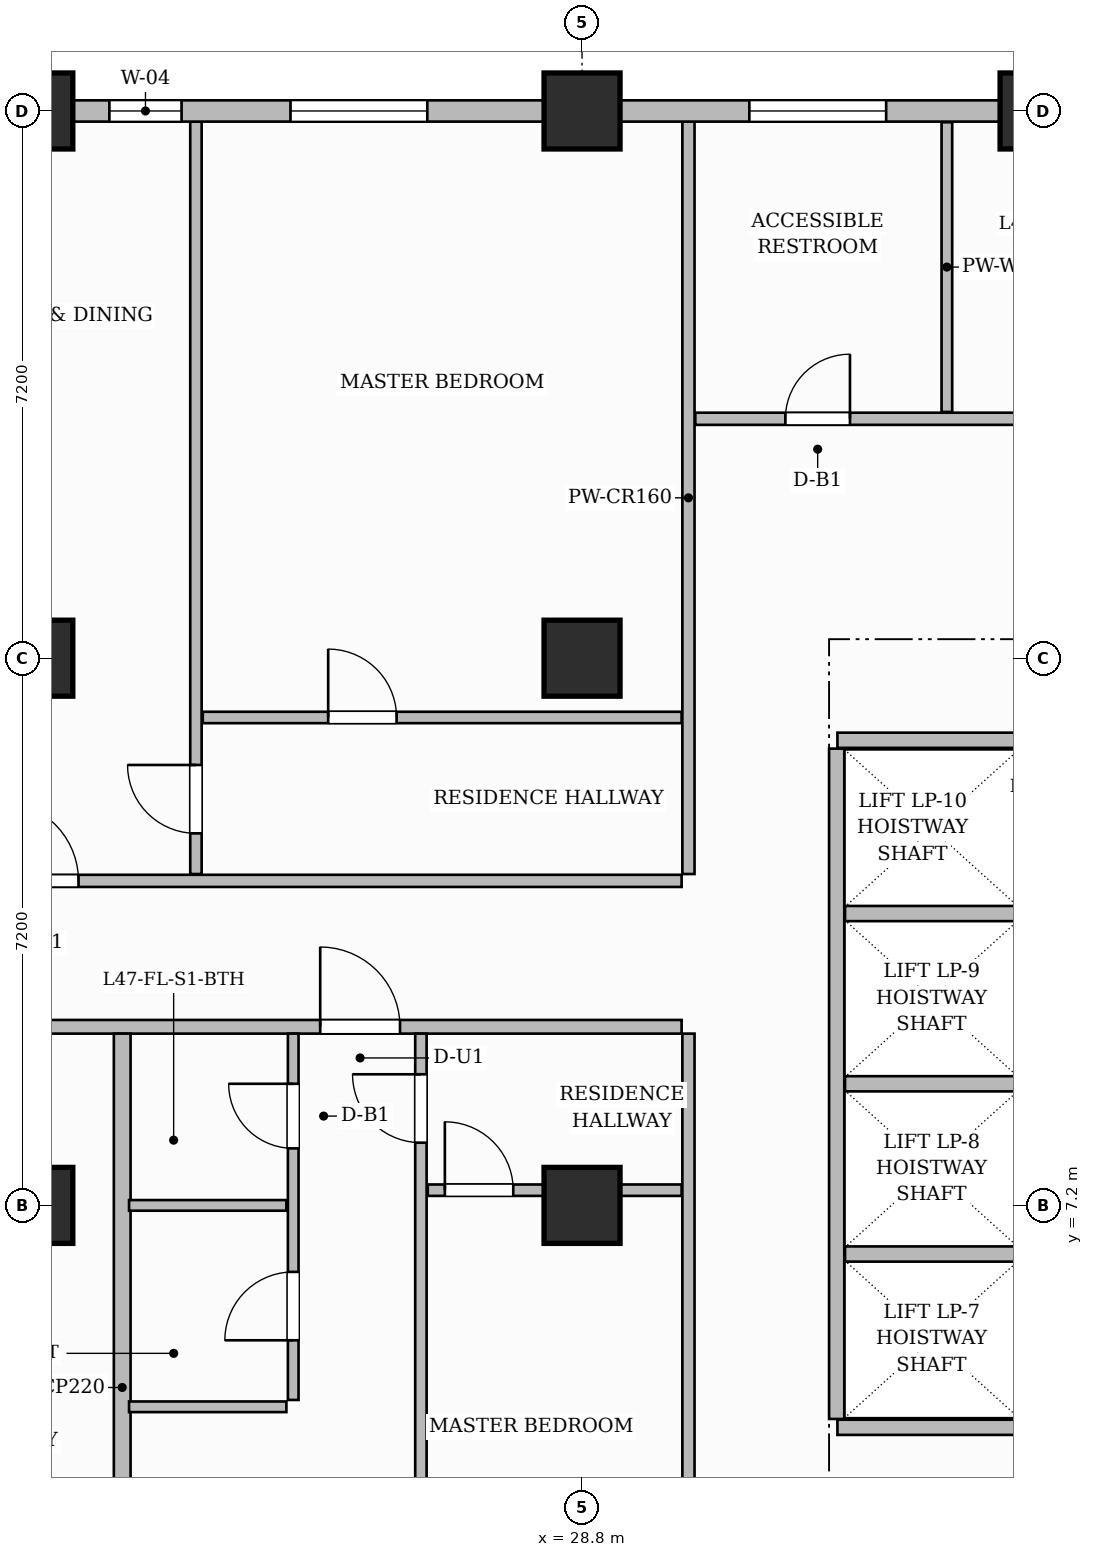
"""IFC4 building model, lengths in metres.
Left out: names, types, materials, properties, quantities, classifications, styles, units other than length and angle.
Written with IfcOpenShell. Run it as: python <this file> out.ifc"""

import sys

from ifc_helpers import new_model, si_unit, direction, frame, frame_2d, origin, origin_2d, place, context, subcontext, project, spatial, rectangle, extrude, source, transform, mapped, element, fill, save


model = new_model("IFC4")
c1 = context("Model", 3, precision=1e-05, world=origin(), true_north=direction((0.0, 1.0)))
c2 = subcontext(c1, "Body", "Model", "MODEL_VIEW")
j1 = project(units=[si_unit("LENGTHUNIT", "METRE"), si_unit("PLANEANGLEUNIT", "RADIAN")], contexts=[c1])
p1 = place(None, origin())
s1 = spatial("IfcSite", under=j1, at=p1, CompositionType="ELEMENT")
p2 = place(p1, origin())
s2 = spatial("IfcBuilding", under=s1, at=p2, CompositionType="ELEMENT")
p3 = place(p2, frame((0.0, 0.0, 188.8)))
s3 = spatial("IfcBuildingStorey", under=s2, at=p3, CompositionType="ELEMENT", Elevation=188.8)
m1 = source(origin(), c2, "Body", "SweptSolid", [
    extrude(rectangle(XDim=1.0, YDim=1.0, at=origin_2d()), origin(), (0.0, 0.0, 1.0), 3.85),
])
for number, where, z_axis, x_axis in (
    (1, (21.6, 7.2, 0.0), (0.0, 0.0, 1.0), (1.0, 0.0, 0.0)),
    (2, (21.6, 14.4, 0.0), (0.0, 0.0, 1.0), (1.0, 0.0, 0.0)),
    (3, (21.6, 21.6, 0.0), (0.0, 0.0, 1.0), (1.0, 0.0, 0.0)),
    (4, (28.8, 7.2, 0.0), (0.0, 0.0, 1.0), (1.0, 0.0, 0.0)),
    (5, (28.8, 14.4, 0.0), (0.0, 0.0, 1.0), (1.0, 0.0, 0.0)),
    (6, (28.8, 21.6, 0.0), (0.0, 0.0, 1.0), (1.0, 0.0, 0.0)),
    (7, (34.8, 21.6, 0.0), (0.0, 0.0, 1.0), (1.0, 0.0, 0.0)),
):
    element("IfcColumn", number, at=place(p3, frame(where, z_axis=z_axis, x_axis=x_axis)), inside=s3, PredefinedType="COLUMN", context=c2, shape_type="MappedRepresentation", body=[
        mapped(m1, transform((0.0, 0.0, 0.0), scale=1.0)),
    ])
for number, where, z_axis, x_axis in (
    (8, (32.16, 4.28, 0.0), (0.0, 0.0, 1.0), (1.0, 0.0, 0.0)),
    (9, (32.16, 13.32, 0.0), (0.0, 0.0, 1.0), (1.0, 0.0, 0.0)),
):
    element("IfcWall", number, at=place(p3, frame(where, z_axis=z_axis, x_axis=x_axis)), inside=s3, PredefinedType="PARTITIONING", context=c2, shape_type="SweptSolid", body=[
        extrude(rectangle(XDim=2.36, YDim=0.2, at=frame_2d((1.18, 0.0))), origin(), (0.0, 0.0, 1.0), 3.6),
    ])
p4 = place(p3, frame((32.15, 4.39, 0.0), z_axis=(0.0, 0.0, 1.0), x_axis=(0.0, 1.0, 0.0)))
e10 = element("IfcWall", 10, at=p4, inside=s3, PredefinedType="PARTITIONING", context=c2, shape_type="SweptSolid", body=[
    extrude(rectangle(XDim=8.82, YDim=0.2, at=frame_2d((4.41, 0.0))), origin(), (0.0, 0.0, 1.0), 3.6),
])
for number, where, z_axis, x_axis in (
    (11, (32.26, 6.56, 0.0), (0.0, 0.0, 1.0), (1.0, 0.0, 0.0)),
    (12, (32.26, 8.8, 0.0), (0.0, 0.0, 1.0), (1.0, 0.0, 0.0)),
    (13, (32.26, 11.04, 0.0), (0.0, 0.0, 1.0), (1.0, 0.0, 0.0)),
):
    element("IfcWall", number, at=place(p3, frame(where, z_axis=z_axis, x_axis=x_axis)), inside=s3, PredefinedType="PARTITIONING", context=c2, shape_type="SweptSolid", body=[
        extrude(rectangle(XDim=2.23, YDim=0.2, at=frame_2d((1.115, 0.0))), origin(), (0.0, 0.0, 1.0), 3.6),
    ])
p5 = place(p3, frame((14.548, 9.55, 0.0), z_axis=(0.0, 0.0, 1.0), x_axis=(1.0, 0.0, 0.0)))
e14 = element("IfcWall", 14, at=p5, inside=s3, PredefinedType="PARTITIONING", context=c2, shape_type="SweptSolid", body=[
    extrude(rectangle(XDim=15.562, YDim=0.18, at=frame_2d((7.781, 0.0))), origin(), (0.0, 0.0, 1.0), 3.6),
])
p6 = place(p5, frame((1.052, 0.0, 0.0)))
e15 = element("IfcOpeningElement", 15, at=p6, cuts=e14, PredefinedType="OPENING", context=c2, shape_type="SweptSolid", body=[
    extrude(rectangle(XDim=1.4, YDim=2.35, at=frame_2d((0.7, 1.175))), frame((0.0, 0.1, 0.0), z_axis=(0.0, -1.0, 0.0), x_axis=(1.0, 0.0, 0.0)), (0.0, 0.0, 1.0), 0.2),
])
p7 = place(p5, frame((5.452, 0.0, 0.0)))
e16 = element("IfcOpeningElement", 16, at=p7, cuts=e14, PredefinedType="OPENING", context=c2, shape_type="SweptSolid", body=[
    extrude(rectangle(XDim=0.95, YDim=2.15, at=frame_2d((0.475, 1.075))), frame((0.0, 0.1, 0.0), z_axis=(0.0, -1.0, 0.0), x_axis=(1.0, 0.0, 0.0)), (0.0, 0.0, 1.0), 0.2),
])
p8 = place(p5, frame((10.807, 0.0, 0.0)))
e17 = element("IfcOpeningElement", 17, at=p8, cuts=e14, PredefinedType="OPENING", context=c2, shape_type="SweptSolid", body=[
    extrude(rectangle(XDim=1.05, YDim=2.25, at=frame_2d((0.525, 1.125))), frame((0.0, 0.1, 0.0), z_axis=(0.0, -1.0, 0.0), x_axis=(1.0, 0.0, 0.0)), (0.0, 0.0, 1.0), 0.2),
])
p9 = place(p3, frame((14.548, 11.47, 0.0), z_axis=(0.0, 0.0, 1.0), x_axis=(1.0, 0.0, 0.0)))
e18 = element("IfcWall", 18, at=p9, inside=s3, PredefinedType="PARTITIONING", context=c2, shape_type="SweptSolid", body=[
    extrude(rectangle(XDim=15.562, YDim=0.16, at=frame_2d((7.781, 0.0))), origin(), (0.0, 0.0, 1.0), 3.6),
])
p10 = place(p9, frame((6.577, 0.0, 0.0)))
e19 = element("IfcOpeningElement", 19, at=p10, cuts=e18, PredefinedType="OPENING", context=c2, shape_type="SweptSolid", body=[
    extrude(rectangle(XDim=1.05, YDim=2.25, at=frame_2d((0.525, 1.125))), frame((0.0, 0.09, 0.0), z_axis=(0.0, -1.0, 0.0), x_axis=(1.0, 0.0, 0.0)), (0.0, 0.0, 1.0), 0.18),
])
p11 = place(p3, frame((30.2, 11.56, 0.0), z_axis=(0.0, 0.0, 1.0), x_axis=(0.0, 1.0, 0.0)))
e20 = element("IfcWall", 20, at=p11, inside=s3, PredefinedType="PARTITIONING", context=c2, shape_type="SweptSolid", body=[
    extrude(rectangle(XDim=9.9, YDim=0.16, at=frame_2d((4.95, 0.0))), origin(), (0.0, 0.0, 1.0), 3.6),
])
p12 = place(p3, frame((30.29, 17.55, 0.0), z_axis=(0.0, 0.0, 1.0), x_axis=(1.0, 0.0, 0.0)))
e21 = element("IfcWall", 21, at=p12, inside=s3, PredefinedType="PARTITIONING", context=c2, shape_type="SweptSolid", body=[
    extrude(rectangle(XDim=19.37, YDim=0.16, at=frame_2d((9.685, 0.0))), origin(), (0.0, 0.0, 1.0), 3.6),
])
p13 = place(p12, frame((1.185, 0.0, 0.0)))
e22 = element("IfcOpeningElement", 22, at=p13, cuts=e21, PredefinedType="OPENING", context=c2, shape_type="SweptSolid", body=[
    extrude(rectangle(XDim=0.85, YDim=2.1, at=frame_2d((0.425, 1.05))), frame((0.0, 0.09, 0.0), z_axis=(0.0, -1.0, 0.0), x_axis=(1.0, 0.0, 0.0)), (0.0, 0.0, 1.0), 0.18),
])
p14 = place(p12, frame((6.66, 0.0, 0.0)))
e23 = element("IfcOpeningElement", 23, at=p14, cuts=e21, PredefinedType="OPENING", context=c2, shape_type="SweptSolid", body=[
    extrude(rectangle(XDim=0.9, YDim=2.15, at=frame_2d((0.45, 1.075))), frame((0.0, 0.09, 0.0), z_axis=(0.0, -1.0, 0.0), x_axis=(1.0, 0.0, 0.0)), (0.0, 0.0, 1.0), 0.18),
])
p15 = place(p12, frame((14.46, 0.0, 0.0)))
e24 = element("IfcOpeningElement", 24, at=p15, cuts=e21, PredefinedType="OPENING", context=c2, shape_type="SweptSolid", body=[
    extrude(rectangle(XDim=1.4, YDim=2.35, at=frame_2d((0.7, 1.175))), frame((0.0, 0.09, 0.0), z_axis=(0.0, -1.0, 0.0), x_axis=(1.0, 0.0, 0.0)), (0.0, 0.0, 1.0), 0.18),
])
p16 = place(p3, frame((30.2, 0.148, 0.0), z_axis=(0.0, 0.0, 1.0), x_axis=(0.0, 1.0, 0.0)))
e25 = element("IfcWall", 25, at=p16, inside=s3, PredefinedType="PARTITIONING", context=c2, shape_type="SweptSolid", body=[
    extrude(rectangle(XDim=9.312, YDim=0.16, at=frame_2d((4.656, 0.0))), origin(), (0.0, 0.0, 1.0), 3.6),
])
p17 = place(p16, frame((1.977, 0.0, 0.0)))
e26 = element("IfcOpeningElement", 26, at=p17, cuts=e25, PredefinedType="OPENING", context=c2, shape_type="SweptSolid", body=[
    extrude(rectangle(XDim=1.05, YDim=2.15, at=frame_2d((0.525, 1.075))), frame((0.0, 0.09, 0.0), z_axis=(0.0, -1.0, 0.0), x_axis=(1.0, 0.0, 0.0)), (0.0, 0.0, 1.0), 0.18),
])
p18 = place(p3, frame((33.6, 17.64, 0.0), z_axis=(0.0, 0.0, 1.0), x_axis=(0.0, 1.0, 0.0)))
e27 = element("IfcWall", 27, at=p18, inside=s3, PredefinedType="PARTITIONING", context=c2, shape_type="SweptSolid", body=[
    extrude(rectangle(XDim=3.812, YDim=0.14, at=frame_2d((1.906, 0.0))), origin(), (0.0, 0.0, 1.0), 3.6),
])
p19 = place(p3, frame((22.75, 0.148, 0.0), z_axis=(0.0, 0.0, 1.0), x_axis=(0.0, 1.0, 0.0)))
e28 = element("IfcWall", 28, at=p19, inside=s3, PredefinedType="PARTITIONING", context=c2, shape_type="SweptSolid", body=[
    extrude(rectangle(XDim=9.312, YDim=0.22, at=frame_2d((4.656, 0.0))), origin(), (0.0, 0.0, 1.0), 3.6),
])
p20 = place(p3, frame((25.0, 4.64, 0.0), z_axis=(0.0, 0.0, 1.0), x_axis=(0.0, 1.0, 0.0)))
e29 = element("IfcWall", 29, at=p20, inside=s3, PredefinedType="PARTITIONING", context=c2, shape_type="SweptSolid", body=[
    extrude(rectangle(XDim=4.82, YDim=0.14, at=frame_2d((2.41, 0.0))), origin(), (0.0, 0.0, 1.0), 3.285),
])
p21 = place(p20, frame((0.785, 0.0, 0.0)))
e30 = element("IfcOpeningElement", 30, at=p21, cuts=e29, PredefinedType="OPENING", context=c2, shape_type="SweptSolid", body=[
    extrude(rectangle(XDim=0.9, YDim=2.15, at=frame_2d((0.45, 1.075))), frame((0.0, 0.08, 0.0), z_axis=(0.0, -1.0, 0.0), x_axis=(1.0, 0.0, 0.0)), (0.0, 0.0, 1.0), 0.16),
])
p22 = place(p20, frame((3.31, 0.0, 0.0)))
e31 = element("IfcOpeningElement", 31, at=p22, cuts=e29, PredefinedType="OPENING", context=c2, shape_type="SweptSolid", body=[
    extrude(rectangle(XDim=0.85, YDim=2.1, at=frame_2d((0.425, 1.05))), frame((0.0, 0.08, 0.0), z_axis=(0.0, -1.0, 0.0), x_axis=(1.0, 0.0, 0.0)), (0.0, 0.0, 1.0), 0.16),
])
p23 = place(p3, frame((22.84, 7.2, 0.0), z_axis=(0.0, 0.0, 1.0), x_axis=(1.0, 0.0, 0.0)))
e32 = element("IfcWall", 32, at=p23, inside=s3, PredefinedType="PARTITIONING", context=c2, shape_type="SweptSolid", body=[
    extrude(rectangle(XDim=2.07, YDim=0.14, at=frame_2d((1.035, 0.0))), origin(), (0.0, 0.0, 1.0), 3.085),
])
p24 = place(p3, frame((22.84, 4.55, 0.0), z_axis=(0.0, 0.0, 1.0), x_axis=(1.0, 0.0, 0.0)))
e33 = element("IfcWall", 33, at=p24, inside=s3, PredefinedType="PARTITIONING", context=c2, shape_type="SweptSolid", body=[
    extrude(rectangle(XDim=2.07, YDim=0.14, at=frame_2d((1.035, 0.0))), origin(), (0.0, 0.0, 1.0), 3.6),
])
p25 = place(p3, frame((26.68, 0.148, 0.0), z_axis=(0.0, 0.0, 1.0), x_axis=(0.0, 1.0, 0.0)))
e34 = element("IfcWall", 34, at=p25, inside=s3, PredefinedType="PARTITIONING", context=c2, shape_type="SweptSolid", body=[
    extrude(rectangle(XDim=9.312, YDim=0.15, at=frame_2d((4.656, 0.0))), origin(), (0.0, 0.0, 1.0), 3.6),
])
p26 = place(p25, frame((7.877, 0.0, 0.0)))
e35 = element("IfcOpeningElement", 35, at=p26, cuts=e34, PredefinedType="OPENING", context=c2, shape_type="SweptSolid", body=[
    extrude(rectangle(XDim=0.9, YDim=2.15, at=frame_2d((0.45, 1.075))), frame((0.0, 0.085, 0.0), z_axis=(0.0, -1.0, 0.0), x_axis=(1.0, 0.0, 0.0)), (0.0, 0.0, 1.0), 0.17),
])
p27 = place(p3, frame((26.77, 7.4, 0.0), z_axis=(0.0, 0.0, 1.0), x_axis=(1.0, 0.0, 0.0)))
e36 = element("IfcWall", 36, at=p27, inside=s3, PredefinedType="PARTITIONING", context=c2, shape_type="SweptSolid", body=[
    extrude(rectangle(XDim=3.34, YDim=0.15, at=frame_2d((1.67, 0.0))), origin(), (0.0, 0.0, 1.0), 3.085),
])
p28 = place(p27, frame((0.225, 0.0, 0.0)))
e37 = element("IfcOpeningElement", 37, at=p28, cuts=e36, PredefinedType="OPENING", context=c2, shape_type="SweptSolid", body=[
    extrude(rectangle(XDim=0.9, YDim=2.15, at=frame_2d((0.45, 1.075))), frame((0.0, 0.085, 0.0), z_axis=(0.0, -1.0, 0.0), x_axis=(1.0, 0.0, 0.0)), (0.0, 0.0, 1.0), 0.17),
])
p29 = place(p3, frame((23.72, 11.56, 0.0), z_axis=(0.0, 0.0, 1.0), x_axis=(0.0, 1.0, 0.0)))
e38 = element("IfcWall", 38, at=p29, inside=s3, PredefinedType="PARTITIONING", context=c2, shape_type="SweptSolid", body=[
    extrude(rectangle(XDim=9.9, YDim=0.15, at=frame_2d((4.95, 0.0))), origin(), (0.0, 0.0, 1.0), 3.6),
])
p30 = place(p29, frame((0.535, 0.0, 0.0)))
e39 = element("IfcOpeningElement", 39, at=p30, cuts=e38, PredefinedType="OPENING", context=c2, shape_type="SweptSolid", body=[
    extrude(rectangle(XDim=0.9, YDim=2.15, at=frame_2d((0.45, 1.075))), frame((0.0, 0.085, 0.0), z_axis=(0.0, -1.0, 0.0), x_axis=(1.0, 0.0, 0.0)), (0.0, 0.0, 1.0), 0.17),
])
p31 = place(p3, frame((23.81, 13.62, 0.0), z_axis=(0.0, 0.0, 1.0), x_axis=(1.0, 0.0, 0.0)))
e40 = element("IfcWall", 40, at=p31, inside=s3, PredefinedType="PARTITIONING", context=c2, shape_type="SweptSolid", body=[
    extrude(rectangle(XDim=6.3, YDim=0.15, at=frame_2d((3.15, 0.0))), origin(), (0.0, 0.0, 1.0), 3.6),
])
p32 = place(p31, frame((1.65, 0.0, 0.0)))
e41 = element("IfcOpeningElement", 41, at=p32, cuts=e40, PredefinedType="OPENING", context=c2, shape_type="SweptSolid", body=[
    extrude(rectangle(XDim=0.9, YDim=2.15, at=frame_2d((0.45, 1.075))), frame((0.0, 0.085, 0.0), z_axis=(0.0, -1.0, 0.0), x_axis=(1.0, 0.0, 0.0)), (0.0, 0.0, 1.0), 0.17),
])
p33 = place(p3, frame((18.0, 21.6, 0.0), z_axis=(0.0, 0.0, 1.0), x_axis=(1.0, 0.0, 0.0)))
e42 = element("IfcWall", 42, at=p33, inside=s3, PredefinedType="SOLIDWALL", context=c2, shape_type="SweptSolid", body=[
    extrude(rectangle(XDim=31.8, YDim=0.28, at=frame_2d((15.9, 0.0))), origin(), (0.0, 0.0, 1.0), 3.085),
])
p34 = place(p33, frame((0.885, 0.0, 0.8)))
e43 = element("IfcOpeningElement", 43, at=p34, cuts=e42, PredefinedType="OPENING", context=c2, shape_type="SweptSolid", body=[
    extrude(rectangle(XDim=1.4, YDim=1.85, at=frame_2d((0.7, 0.925))), frame((0.0, 0.15, 0.0), z_axis=(0.0, -1.0, 0.0), x_axis=(1.0, 0.0, 0.0)), (0.0, 0.0, 1.0), 0.3),
])
p35 = place(p33, frame((4.581, 0.0, 0.8)))
e44 = element("IfcOpeningElement", 44, at=p35, cuts=e42, PredefinedType="OPENING", context=c2, shape_type="SweptSolid", body=[
    extrude(rectangle(XDim=0.95, YDim=1.75, at=frame_2d((0.475, 0.875))), frame((0.0, 0.15, 0.0), z_axis=(0.0, -1.0, 0.0), x_axis=(1.0, 0.0, 0.0)), (0.0, 0.0, 1.0), 0.3),
])
p36 = place(p33, frame((6.964, 0.0, 0.8)))
e45 = element("IfcOpeningElement", 45, at=p36, cuts=e42, PredefinedType="OPENING", context=c2, shape_type="SweptSolid", body=[
    extrude(rectangle(XDim=1.8, YDim=1.85, at=frame_2d((0.9, 0.925))), frame((0.0, 0.15, 0.0), z_axis=(0.0, -1.0, 0.0), x_axis=(1.0, 0.0, 0.0)), (0.0, 0.0, 1.0), 0.3),
])
p37 = place(p33, frame((13.001, 0.0, 0.8)))
e46 = element("IfcOpeningElement", 46, at=p37, cuts=e42, PredefinedType="OPENING", context=c2, shape_type="SweptSolid", body=[
    extrude(rectangle(XDim=1.8, YDim=1.85, at=frame_2d((0.9, 0.925))), frame((0.0, 0.15, 0.0), z_axis=(0.0, -1.0, 0.0), x_axis=(1.0, 0.0, 0.0)), (0.0, 0.0, 1.0), 0.3),
])
p38 = place(p33, frame((18.123, 0.0, 0.8)))
e47 = element("IfcOpeningElement", 47, at=p38, cuts=e42, PredefinedType="OPENING", context=c2, shape_type="SweptSolid", body=[
    extrude(rectangle(XDim=1.8, YDim=1.85, at=frame_2d((0.9, 0.925))), frame((0.0, 0.15, 0.0), z_axis=(0.0, -1.0, 0.0), x_axis=(1.0, 0.0, 0.0)), (0.0, 0.0, 1.0), 0.3),
])
p39 = place(p33, frame((20.869, 0.0, 0.8)))
e48 = element("IfcOpeningElement", 48, at=p39, cuts=e42, PredefinedType="OPENING", context=c2, shape_type="SweptSolid", body=[
    extrude(rectangle(XDim=1.8, YDim=1.85, at=frame_2d((0.9, 0.925))), frame((0.0, 0.15, 0.0), z_axis=(0.0, -1.0, 0.0), x_axis=(1.0, 0.0, 0.0)), (0.0, 0.0, 1.0), 0.3),
])
p40 = place(p33, frame((25.475, 0.0, 0.8)))
e49 = element("IfcOpeningElement", 49, at=p40, cuts=e42, PredefinedType="OPENING", context=c2, shape_type="SweptSolid", body=[
    extrude(rectangle(XDim=1.8, YDim=1.85, at=frame_2d((0.9, 0.925))), frame((0.0, 0.15, 0.0), z_axis=(0.0, -1.0, 0.0), x_axis=(1.0, 0.0, 0.0)), (0.0, 0.0, 1.0), 0.3),
])
p41 = place(p33, frame((28.525, 0.0, 0.8)))
e50 = element("IfcOpeningElement", 50, at=p41, cuts=e42, PredefinedType="OPENING", context=c2, shape_type="SweptSolid", body=[
    extrude(rectangle(XDim=1.8, YDim=1.85, at=frame_2d((0.9, 0.925))), frame((0.0, 0.15, 0.0), z_axis=(0.0, -1.0, 0.0), x_axis=(1.0, 0.0, 0.0)), (0.0, 0.0, 1.0), 0.3),
])
m2 = source(origin(), c2, "Body", "SweptSolid", [
    extrude(rectangle(XDim=0.85, YDim=2.1, at=frame_2d((0.425, 1.05))), frame((0.0, 0.025, 0.0), z_axis=(0.0, -1.0, 0.0), x_axis=(1.0, 0.0, 0.0)), (0.0, 0.0, 1.0), 0.05),
])
p42 = place(p13, origin())
e51 = element("IfcDoor", 51, at=p42, inside=s3, OperationType="SINGLE_SWING_RIGHT", PredefinedType="DOOR", context=c2, shape_type="MappedRepresentation", body=[
    mapped(m2, transform((0.0, 0.0, 0.0), scale=1.0)),
])
fill(e22, e51)
m3 = source(origin(), c2, "Body", "SweptSolid", [
    extrude(rectangle(XDim=0.9, YDim=2.15, at=frame_2d((0.45, 1.075))), frame((0.0, 0.025, 0.0), z_axis=(0.0, -1.0, 0.0), x_axis=(1.0, 0.0, 0.0)), (0.0, 0.0, 1.0), 0.05),
])
p43 = place(p21, origin())
e52 = element("IfcDoor", 52, at=p43, inside=s3, OperationType="SINGLE_SWING_LEFT", PredefinedType="DOOR", context=c2, shape_type="MappedRepresentation", body=[
    mapped(m3, transform((0.0, 0.0, 0.0), scale=1.0)),
])
fill(e30, e52)
p44 = place(p22, origin())
e53 = element("IfcDoor", 53, at=p44, inside=s3, OperationType="SINGLE_SWING_RIGHT", PredefinedType="DOOR", context=c2, shape_type="MappedRepresentation", body=[
    mapped(m2, transform((0.0, 0.0, 0.0), scale=1.0)),
])
fill(e31, e53)
m4 = source(origin(), c2, "Body", "SweptSolid", [
    extrude(rectangle(XDim=1.05, YDim=2.25, at=frame_2d((0.525, 1.125))), frame((0.0, 0.025, 0.0), z_axis=(0.0, -1.0, 0.0), x_axis=(1.0, 0.0, 0.0)), (0.0, 0.0, 1.0), 0.05),
])
p45 = place(p8, origin())
e54 = element("IfcDoor", 54, at=p45, inside=s3, OperationType="SINGLE_SWING_LEFT", PredefinedType="DOOR", context=c2, shape_type="MappedRepresentation", body=[
    mapped(m4, transform((0.0, 0.0, 0.0), scale=1.0)),
])
fill(e17, e54)
p46 = place(p26, origin())
e55 = element("IfcDoor", 55, at=p46, inside=s3, OperationType="SINGLE_SWING_RIGHT", PredefinedType="DOOR", context=c2, shape_type="MappedRepresentation", body=[
    mapped(m3, transform((0.0, 0.0, 0.0), scale=1.0)),
])
fill(e35, e55)
p47 = place(p28, origin())
e56 = element("IfcDoor", 56, at=p47, inside=s3, OperationType="SINGLE_SWING_LEFT", PredefinedType="DOOR", context=c2, shape_type="MappedRepresentation", body=[
    mapped(m3, transform((0.0, 0.0, 0.0), scale=1.0)),
])
fill(e37, e56)
p48 = place(p10, origin())
e57 = element("IfcDoor", 57, at=p48, inside=s3, OperationType="SINGLE_SWING_LEFT", PredefinedType="DOOR", context=c2, shape_type="MappedRepresentation", body=[
    mapped(m4, transform((0.0, 0.0, 0.0), scale=1.0)),
])
fill(e19, e57)
p49 = place(p30, origin())
e58 = element("IfcDoor", 58, at=p49, inside=s3, OperationType="SINGLE_SWING_RIGHT", PredefinedType="DOOR", context=c2, shape_type="MappedRepresentation", body=[
    mapped(m3, transform((0.0, 0.0, 0.0), scale=1.0)),
])
fill(e39, e58)
p50 = place(p32, origin())
e59 = element("IfcDoor", 59, at=p50, inside=s3, OperationType="SINGLE_SWING_LEFT", PredefinedType="DOOR", context=c2, shape_type="MappedRepresentation", body=[
    mapped(m3, transform((0.0, 0.0, 0.0), scale=1.0)),
])
fill(e41, e59)
m5 = source(origin(), c2, "Body", "SweptSolid", [
    extrude(rectangle(XDim=0.95, YDim=1.75, at=frame_2d((0.475, 0.875))), frame((0.0, 0.03, 0.0), z_axis=(0.0, -1.0, 0.0), x_axis=(1.0, 0.0, 0.0)), (0.0, 0.0, 1.0), 0.06),
])
p51 = place(p35, origin())
e60 = element("IfcWindow", 60, at=p51, inside=s3, PartitioningType="SINGLE_PANEL", PredefinedType="WINDOW", context=c2, shape_type="MappedRepresentation", body=[
    mapped(m5, transform((0.0, 0.0, 0.0), scale=1.0)),
])
fill(e44, e60)
m6 = source(origin(), c2, "Body", "SweptSolid", [
    extrude(rectangle(XDim=1.8, YDim=1.85, at=frame_2d((0.9, 0.925))), frame((0.0, 0.03, 0.0), z_axis=(0.0, -1.0, 0.0), x_axis=(1.0, 0.0, 0.0)), (0.0, 0.0, 1.0), 0.06),
])
p52 = place(p36, origin())
e61 = element("IfcWindow", 61, at=p52, inside=s3, PartitioningType="DOUBLE_PANEL_VERTICAL", PredefinedType="WINDOW", context=c2, shape_type="MappedRepresentation", body=[
    mapped(m6, transform((0.0, 0.0, 0.0), scale=1.0)),
])
fill(e45, e61)
p53 = place(p37, origin())
e62 = element("IfcWindow", 62, at=p53, inside=s3, PartitioningType="DOUBLE_PANEL_VERTICAL", PredefinedType="WINDOW", context=c2, shape_type="MappedRepresentation", body=[
    mapped(m6, transform((0.0, 0.0, 0.0), scale=1.0)),
])
fill(e46, e62)
save(model, sys.argv[1])
